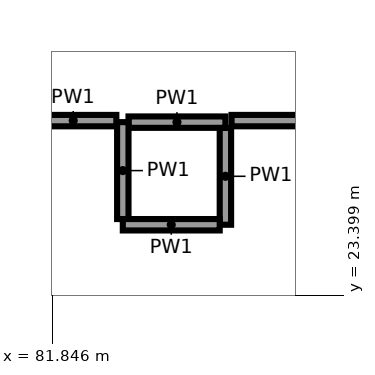
"""IFC4 building model, lengths in metres.
Left out: names, types, materials, properties, quantities, classifications, styles, units other than length and angle.
Written with IfcOpenShell. Run it as: python <this file> out.ifc"""

import sys

from ifc_helpers import new_model, si_unit, direction, frame, frame_2d, origin, place, context, subcontext, project, spatial, rectangle, extrude, element, save


model = new_model("IFC4")
c1 = context("Model", 3, precision=1e-05, world=origin(), true_north=direction((0.0, 1.0)))
c2 = subcontext(c1, "Body", "Model", "MODEL_VIEW")
j1 = project(units=[si_unit("LENGTHUNIT", "METRE"), si_unit("PLANEANGLEUNIT", "RADIAN")], contexts=[c1])
p1 = place(None, origin())
s1 = spatial("IfcSite", under=j1, at=p1, CompositionType="ELEMENT")
p2 = place(p1, origin())
s2 = spatial("IfcBuilding", under=s1, at=p2, CompositionType="ELEMENT")
p3 = place(p2, frame((0.0, 0.0, 12.0)))
s3 = spatial("IfcBuildingStorey", under=s2, at=p3, CompositionType="ELEMENT", Elevation=12.0)
p4 = place(p3, frame((84.125, 24.325, 0.0), z_axis=(0.0, 0.0, 1.0), x_axis=(0.0, 1.0, 0.0)))
e1 = element("IfcWall", 1, at=p4, inside=s3, PredefinedType="PARTITIONING", context=c2, shape_type="SweptSolid", body=[
    extrude(rectangle(XDim=1.275, YDim=0.15, at=frame_2d((0.638, 0.0))), origin(), (0.0, 0.0, 1.0), 5.65),
])
p5 = place(p3, frame((84.125, 25.675, 0.0), z_axis=(0.0, 0.0, 1.0), x_axis=(-1.0, 0.0, 0.0)))
e2 = element("IfcWall", 2, at=p5, inside=s3, PredefinedType="PARTITIONING", context=c2, shape_type="SweptSolid", body=[
    extrude(rectangle(XDim=1.275, YDim=0.15, at=frame_2d((0.637, 0.0))), origin(), (0.0, 0.0, 1.0), 5.65),
])
for number, where, z_axis, x_axis in (
    (3, (82.775, 25.675, 0.0), (0.0, 0.0, 1.0), (0.0, -1.0, 0.0)),
    (4, (82.775, 24.325, 0.0), (0.0, 0.0, 1.0), (1.0, 0.0, 0.0)),
):
    element("IfcWall", number, at=place(p3, frame(where, z_axis=z_axis, x_axis=x_axis)), inside=s3, PredefinedType="PARTITIONING", context=c2, shape_type="SweptSolid", body=[
        extrude(rectangle(XDim=1.275, YDim=0.15, at=frame_2d((0.638, 0.0))), origin(), (0.0, 0.0, 1.0), 5.65),
    ])
p6 = place(p3, frame((87.909, 25.695, 0.0), z_axis=(0.0, 0.0, 1.0), x_axis=(-0.999999997827, -6.5919578e-05, 0.0)))
e5 = element("IfcWall", 5, at=p6, inside=s3, PredefinedType="PARTITIONING", context=c2, shape_type="SweptSolid", body=[
    extrude(rectangle(XDim=3.704, YDim=0.15, at=frame_2d((1.852, 0.0))), origin(), (0.0, 0.0, 1.0), 4.55),
])
p7 = place(p6, frame((0.65, 0.0, 0.0)))
e6 = element("IfcOpeningElement", 6, at=p7, cuts=e5, PredefinedType="OPENING", context=c2, shape_type="SweptSolid", body=[
    extrude(rectangle(XDim=1.8, YDim=2.1, at=frame_2d((0.9, 1.05))), frame((0.0, 0.085, 0.0), z_axis=(0.0, -1.0, 0.0), x_axis=(1.0, 0.0, 0.0)), (0.0, 0.0, 1.0), 0.17),
])
p8 = place(p3, frame((82.69, 25.695, 0.0), z_axis=(0.0, 0.0, 1.0), x_axis=(-1.0, 0.0, 0.0)))
e7 = element("IfcWall", 7, at=p8, inside=s3, PredefinedType="PARTITIONING", context=c2, shape_type="SweptSolid", body=[
    extrude(rectangle(XDim=1.135, YDim=0.15, at=frame_2d((0.567, 0.0))), origin(), (0.0, 0.0, 1.0), 5.65),
])
save(model, sys.argv[1])
